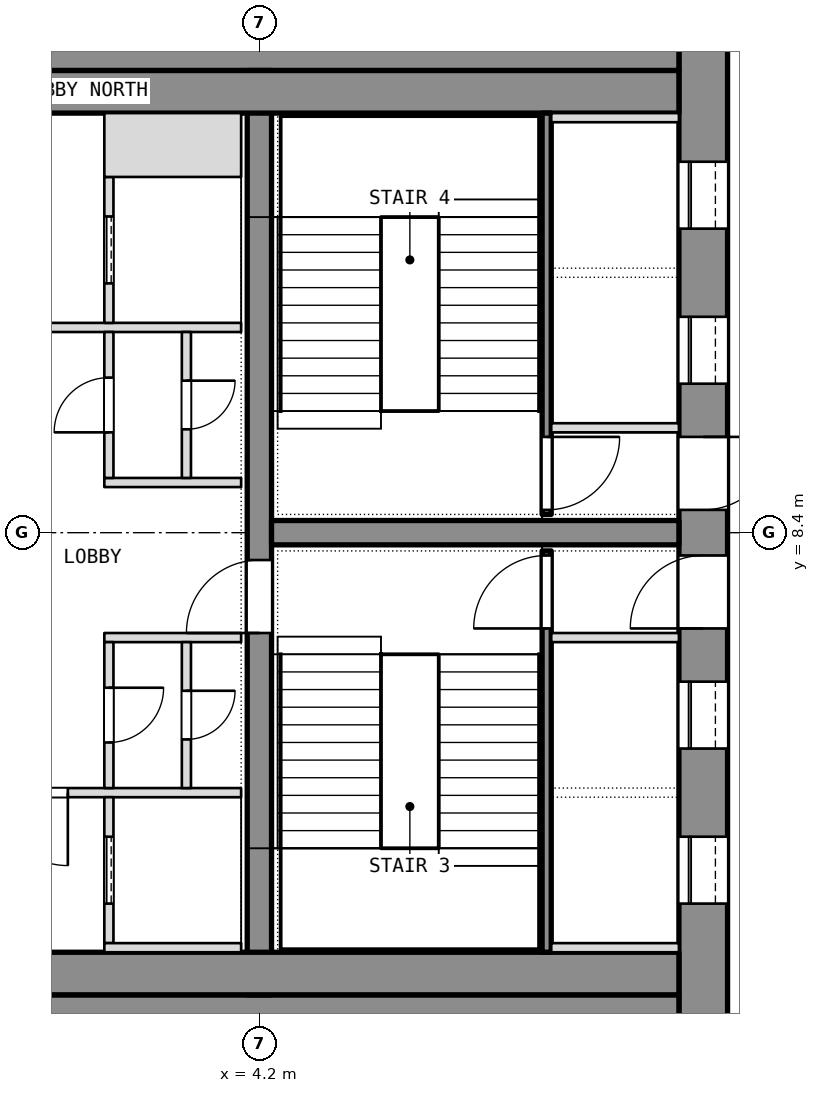
"""IFC4 building model, lengths in metres.
Left out: names, types, materials, properties, quantities, classifications, styles, units other than length and angle.
Written with IfcOpenShell. Run it as: python <this file> out.ifc"""

import sys

from ifc_helpers import new_model, si_unit, direction, frame, frame_2d, origin, place, context, subcontext, project, spatial, rectangle, extrude, element, fill, save


model = new_model("IFC4")
c1 = context("Model", 3, precision=1e-05, world=origin(), true_north=direction((0.0, 1.0)))
c2 = subcontext(c1, "Body", "Model", "MODEL_VIEW")
j1 = project(units=[si_unit("LENGTHUNIT", "METRE"), si_unit("PLANEANGLEUNIT", "RADIAN")], contexts=[c1])
p1 = place(None, origin())
s1 = spatial("IfcSite", under=j1, at=p1, CompositionType="ELEMENT")
p2 = place(p1, origin())
s2 = spatial("IfcBuilding", under=s1, at=p2, CompositionType="ELEMENT")
p3 = place(p2, frame((0.0, 0.0, 248.9)))
s3 = spatial("IfcBuildingStorey", under=s2, at=p3, CompositionType="ELEMENT", Elevation=248.9)
p4 = place(p3, frame((11.5, 0.0, 0.0), z_axis=(0.0, 0.0, 1.0), x_axis=(0.0, 1.0, 0.0)))
e1 = element("IfcWall", 1, at=p4, inside=s3, PredefinedType="SHEAR", context=c2, shape_type="SweptSolid", body=[
    extrude(rectangle(XDim=16.8, YDim=0.8, at=frame_2d((8.4, 0.0))), origin(), (0.0, 0.0, 1.0), 3.6),
])
p5 = place(p4, frame((2.3, 0.0, 0.0)))
e2 = element("IfcOpeningElement", 2, at=p5, cuts=e1, PredefinedType="OPENING", context=c2, shape_type="SweptSolid", body=[
    extrude(rectangle(XDim=1.1, YDim=2.1, at=frame_2d((0.55, 1.05))), frame((0.0, 0.4, 0.0), z_axis=(0.0, -1.0, 0.0), x_axis=(1.0, 0.0, 0.0)), (0.0, 0.0, 1.0), 0.8),
])
p6 = place(p4, frame((4.85, 0.0, 0.0)))
e3 = element("IfcOpeningElement", 3, at=p6, cuts=e1, PredefinedType="OPENING", context=c2, shape_type="SweptSolid", body=[
    extrude(rectangle(XDim=1.1, YDim=2.1, at=frame_2d((0.55, 1.05))), frame((0.0, 0.4, 0.0), z_axis=(0.0, -1.0, 0.0), x_axis=(1.0, 0.0, 0.0)), (0.0, 0.0, 1.0), 0.8),
])
p7 = place(p4, frame((6.825, 0.0, 0.0)))
e4 = element("IfcOpeningElement", 4, at=p7, cuts=e1, PredefinedType="OPENING", context=c2, shape_type="SweptSolid", body=[
    extrude(rectangle(XDim=1.2, YDim=2.1, at=frame_2d((0.6, 1.05))), frame((0.0, 0.4, 0.0), z_axis=(0.0, -1.0, 0.0), x_axis=(1.0, 0.0, 0.0)), (0.0, 0.0, 1.0), 0.8),
])
p8 = place(p4, frame((13.4, 0.0, 0.0)))
e5 = element("IfcOpeningElement", 5, at=p8, cuts=e1, PredefinedType="OPENING", context=c2, shape_type="SweptSolid", body=[
    extrude(rectangle(XDim=1.1, YDim=2.1, at=frame_2d((0.55, 1.05))), frame((0.0, 0.4, 0.0), z_axis=(0.0, -1.0, 0.0), x_axis=(1.0, 0.0, 0.0)), (0.0, 0.0, 1.0), 0.8),
])
p9 = place(p4, frame((10.85, 0.0, 0.0)))
e6 = element("IfcOpeningElement", 6, at=p9, cuts=e1, PredefinedType="OPENING", context=c2, shape_type="SweptSolid", body=[
    extrude(rectangle(XDim=1.1, YDim=2.1, at=frame_2d((0.55, 1.05))), frame((0.0, 0.4, 0.0), z_axis=(0.0, -1.0, 0.0), x_axis=(1.0, 0.0, 0.0)), (0.0, 0.0, 1.0), 0.8),
])
p10 = place(p4, frame((8.775, 0.0, 0.0)))
e7 = element("IfcOpeningElement", 7, at=p10, cuts=e1, PredefinedType="OPENING", context=c2, shape_type="SweptSolid", body=[
    extrude(rectangle(XDim=1.2, YDim=2.1, at=frame_2d((0.6, 1.05))), frame((0.0, 0.4, 0.0), z_axis=(0.0, -1.0, 0.0), x_axis=(1.0, 0.0, 0.0)), (0.0, 0.0, 1.0), 0.8),
])
for number, where, z_axis, x_axis in (
    (8, (-11.1, 0.4, 0.0), (0.0, 0.0, 1.0), (1.0, 0.0, 0.0)),
    (9, (-11.1, 16.4, 0.0), (0.0, 0.0, 1.0), (1.0, 0.0, 0.0)),
):
    element("IfcWall", number, at=place(p3, frame(where, z_axis=z_axis, x_axis=x_axis)), inside=s3, PredefinedType="SHEAR", context=c2, shape_type="SweptSolid", body=[
        extrude(rectangle(XDim=22.2, YDim=0.8, at=frame_2d((11.1, 0.0))), origin(), (0.0, 0.0, 1.0), 3.6),
    ])
p11 = place(p3, frame((4.2, 0.8, 0.0), z_axis=(0.0, 0.0, 1.0), x_axis=(0.0, 1.0, 0.0)))
e10 = element("IfcWall", 10, at=p11, inside=s3, PredefinedType="SHEAR", context=c2, shape_type="SweptSolid", body=[
    extrude(rectangle(XDim=15.2, YDim=0.4, at=frame_2d((7.6, 0.0))), origin(), (0.0, 0.0, 1.0), 3.6),
])
p12 = place(p11, frame((5.95, 0.0, 0.0)))
e11 = element("IfcOpeningElement", 11, at=p12, cuts=e10, PredefinedType="OPENING", context=c2, shape_type="SweptSolid", body=[
    extrude(rectangle(XDim=1.2, YDim=2.1, at=frame_2d((0.6, 1.05))), frame((0.0, 0.2, 0.0), z_axis=(0.0, -1.0, 0.0), x_axis=(1.0, 0.0, 0.0)), (0.0, 0.0, 1.0), 0.4),
])
p13 = place(p3, frame((4.4, 8.4, 0.0), z_axis=(0.0, 0.0, 1.0), x_axis=(1.0, 0.0, 0.0)))
e12 = element("IfcWall", 12, at=p13, inside=s3, PredefinedType="SHEAR", context=c2, shape_type="SweptSolid", body=[
    extrude(rectangle(XDim=6.7, YDim=0.4, at=frame_2d((3.35, 0.0))), origin(), (0.0, 0.0, 1.0), 3.6),
])
for number, where, z_axis, x_axis in (
    (13, (-11.1, 1.15, 0.0), (0.0, 0.0, 1.0), (1.0, 0.0, 0.0)),
    (14, (-11.1, 15.65, 0.0), (0.0, 0.0, 1.0), (1.0, 0.0, 0.0)),
):
    element("IfcWall", number, at=place(p3, frame(where, z_axis=z_axis, x_axis=x_axis)), inside=s3, PredefinedType="PARTITIONING", context=c2, shape_type="SweptSolid", body=[
        extrude(rectangle(XDim=22.2, YDim=0.7, at=frame_2d((11.1, 0.0))), origin(), (0.0, 0.0, 1.0), 3.3),
    ])
p14 = place(p3, frame((8.925, 1.5, 0.0), z_axis=(0.0, 0.0, 1.0), x_axis=(0.0, 1.0, 0.0)))
e15 = element("IfcWall", 15, at=p14, inside=s3, PredefinedType="SHEAR", context=c2, shape_type="SweptSolid", body=[
    extrude(rectangle(XDim=6.6, YDim=0.15, at=frame_2d((3.3, 0.0))), origin(), (0.0, 0.0, 1.0), 3.3),
])
p15 = place(p14, frame((5.325, 0.0, 0.0)))
e16 = element("IfcOpeningElement", 16, at=p15, cuts=e15, PredefinedType="OPENING", context=c2, shape_type="SweptSolid", body=[
    extrude(rectangle(XDim=1.2, YDim=2.1, at=frame_2d((0.6, 1.05))), frame((0.0, 0.075, 0.0), z_axis=(0.0, -1.0, 0.0), x_axis=(1.0, 0.0, 0.0)), (0.0, 0.0, 1.0), 0.15),
])
for number, where, z_axis, x_axis in (
    (17, (9.0, 6.675, 0.0), (0.0, 0.0, 1.0), (1.0, 0.0, 0.0)),
    (18, (9.0, 1.575, 0.0), (0.0, 0.0, 1.0), (1.0, 0.0, 0.0)),
):
    element("IfcWall", number, at=place(p3, frame(where, z_axis=z_axis, x_axis=x_axis)), inside=s3, PredefinedType="SHEAR", context=c2, shape_type="SweptSolid", body=[
        extrude(rectangle(XDim=2.1, YDim=0.15, at=frame_2d((1.05, 0.0))), origin(), (0.0, 0.0, 1.0), 3.6),
    ])
p16 = place(p3, frame((8.925, 8.7, 0.0), z_axis=(0.0, 0.0, 1.0), x_axis=(0.0, 1.0, 0.0)))
e19 = element("IfcWall", 19, at=p16, inside=s3, PredefinedType="SHEAR", context=c2, shape_type="SweptSolid", body=[
    extrude(rectangle(XDim=6.6, YDim=0.15, at=frame_2d((3.3, 0.0))), origin(), (0.0, 0.0, 1.0), 3.3),
])
p17 = place(p16, frame((0.075, 0.0, 0.0)))
e20 = element("IfcOpeningElement", 20, at=p17, cuts=e19, PredefinedType="OPENING", context=c2, shape_type="SweptSolid", body=[
    extrude(rectangle(XDim=1.2, YDim=2.1, at=frame_2d((0.6, 1.05))), frame((0.0, 0.075, 0.0), z_axis=(0.0, -1.0, 0.0), x_axis=(1.0, 0.0, 0.0)), (0.0, 0.0, 1.0), 0.15),
])
for number, where, z_axis, x_axis in (
    (21, (9.0, 10.125, 0.0), (0.0, 0.0, 1.0), (1.0, 0.0, 0.0)),
    (22, (9.0, 15.225, 0.0), (0.0, 0.0, 1.0), (1.0, 0.0, 0.0)),
):
    element("IfcWall", number, at=place(p3, frame(where, z_axis=z_axis, x_axis=x_axis)), inside=s3, PredefinedType="SHEAR", context=c2, shape_type="SweptSolid", body=[
        extrude(rectangle(XDim=2.1, YDim=0.15, at=frame_2d((1.05, 0.0))), origin(), (0.0, 0.0, 1.0), 3.6),
    ])
p18 = place(p3, frame((-3.9, 4.125, 0.0), z_axis=(0.0, 0.0, 1.0), x_axis=(1.0, 0.0, 0.0)))
e23 = element("IfcWall", 23, at=p18, inside=s3, PredefinedType="PARTITIONING", context=c2, shape_type="SweptSolid", body=[
    extrude(rectangle(XDim=7.8, YDim=0.15, at=frame_2d((3.9, 0.0))), origin(), (0.0, 0.0, 1.0), 3.3),
])
p19 = place(p18, frame((3.75, 0.0, 0.0)))
e24 = element("IfcOpeningElement", 24, at=p19, cuts=e23, PredefinedType="OPENING", context=c2, shape_type="SweptSolid", body=[
    extrude(rectangle(XDim=1.2, YDim=2.1, at=frame_2d((0.6, 1.05))), frame((0.0, 0.075, 0.0), z_axis=(0.0, -1.0, 0.0), x_axis=(1.0, 0.0, 0.0)), (0.0, 0.0, 1.0), 0.15),
])
p20 = place(p3, frame((-3.9, 11.775, 0.0), z_axis=(0.0, 0.0, 1.0), x_axis=(1.0, 0.0, 0.0)))
e25 = element("IfcWall", 25, at=p20, inside=s3, PredefinedType="PARTITIONING", context=c2, shape_type="SweptSolid", body=[
    extrude(rectangle(XDim=7.8, YDim=0.15, at=frame_2d((3.9, 0.0))), origin(), (0.0, 0.0, 1.0), 3.3),
])
p21 = place(p20, frame((3.3, 0.0, 0.0)))
e26 = element("IfcOpeningElement", 26, at=p21, cuts=e25, PredefinedType="OPENING", context=c2, shape_type="SweptSolid", body=[
    extrude(rectangle(XDim=1.2, YDim=2.1, at=frame_2d((0.6, 1.05))), frame((0.0, 0.075, 0.0), z_axis=(0.0, -1.0, 0.0), x_axis=(1.0, 0.0, 0.0)), (0.0, 0.0, 1.0), 0.15),
])
p22 = place(p3, frame((1.725, 1.65, 0.0), z_axis=(0.0, 0.0, 1.0), x_axis=(0.0, 1.0, 0.0)))
e27 = element("IfcWall", 27, at=p22, inside=s3, PredefinedType="SHEAR", context=c2, shape_type="SweptSolid", body=[
    extrude(rectangle(XDim=2.4, YDim=0.15, at=frame_2d((1.2, 0.0))), origin(), (0.0, 0.0, 1.0), 3.6),
])
p23 = place(p22, frame((0.65, 0.0, 0.0)))
e28 = element("IfcOpeningElement", 28, at=p23, cuts=e27, PredefinedType="OPENING", context=c2, shape_type="SweptSolid", body=[
    extrude(rectangle(XDim=1.1, YDim=2.1, at=frame_2d((0.55, 1.05))), frame((0.0, 0.075, 0.0), z_axis=(0.0, -1.0, 0.0), x_axis=(1.0, 0.0, 0.0)), (0.0, 0.0, 1.0), 0.15),
])
p24 = place(p3, frame((1.65, 1.575, 0.0), z_axis=(0.0, 0.0, 1.0), x_axis=(1.0, 0.0, 0.0)))
e29 = element("IfcWall", 29, at=p24, inside=s3, PredefinedType="SHEAR", context=c2, shape_type="SweptSolid", body=[
    extrude(rectangle(XDim=2.25, YDim=0.15, at=frame_2d((1.125, 0.0))), origin(), (0.0, 0.0, 1.0), 3.6),
])
p25 = place(p3, frame((1.725, 11.85, 0.0), z_axis=(0.0, 0.0, 1.0), x_axis=(0.0, 1.0, 0.0)))
e30 = element("IfcWall", 30, at=p25, inside=s3, PredefinedType="SHEAR", context=c2, shape_type="SweptSolid", body=[
    extrude(rectangle(XDim=2.4, YDim=0.15, at=frame_2d((1.2, 0.0))), origin(), (0.0, 0.0, 1.0), 3.6),
])
p26 = place(p25, frame((0.65, 0.0, 0.0)))
e31 = element("IfcOpeningElement", 31, at=p26, cuts=e30, PredefinedType="OPENING", context=c2, shape_type="SweptSolid", body=[
    extrude(rectangle(XDim=1.1, YDim=2.1, at=frame_2d((0.55, 1.05))), frame((0.0, 0.075, 0.0), z_axis=(0.0, -1.0, 0.0), x_axis=(1.0, 0.0, 0.0)), (0.0, 0.0, 1.0), 0.15),
])
p27 = place(p3, frame((1.65, 14.775, 0.0), z_axis=(0.0, 0.0, 1.0), x_axis=(1.0, 0.0, 0.0)))
e32 = element("IfcWall", 32, at=p27, inside=s3, PredefinedType="SHEAR", context=c2, shape_type="SweptSolid", body=[
    extrude(rectangle(XDim=2.25, YDim=1.05, at=frame_2d((1.125, 0.0))), origin(), (0.0, 0.0, 1.0), 3.6),
])
for number, where, z_axis, x_axis in (
    (33, (1.65, 6.675, 0.0), (0.0, 0.0, 1.0), (1.0, 0.0, 0.0)),
    (34, (1.65, 9.225, 0.0), (0.0, 0.0, 1.0), (1.0, 0.0, 0.0)),
):
    element("IfcWall", number, at=place(p3, frame(where, z_axis=z_axis, x_axis=x_axis)), inside=s3, PredefinedType="PARTITIONING", context=c2, shape_type="SweptSolid", body=[
        extrude(rectangle(XDim=2.25, YDim=0.15, at=frame_2d((1.125, 0.0))), origin(), (0.0, 0.0, 1.0), 3.3),
    ])
p28 = place(p3, frame((1.725, 4.2, 0.0), z_axis=(0.0, 0.0, 1.0), x_axis=(0.0, 1.0, 0.0)))
e35 = element("IfcWall", 35, at=p28, inside=s3, PredefinedType="PARTITIONING", context=c2, shape_type="SweptSolid", body=[
    extrude(rectangle(XDim=2.4, YDim=0.15, at=frame_2d((1.2, 0.0))), origin(), (0.0, 0.0, 1.0), 3.3),
])
p29 = place(p28, frame((0.75, 0.0, 0.0)))
e36 = element("IfcOpeningElement", 36, at=p29, cuts=e35, PredefinedType="OPENING", context=c2, shape_type="SweptSolid", body=[
    extrude(rectangle(XDim=0.9, YDim=2.1, at=frame_2d((0.45, 1.05))), frame((0.0, 0.075, 0.0), z_axis=(0.0, -1.0, 0.0), x_axis=(1.0, 0.0, 0.0)), (0.0, 0.0, 1.0), 0.15),
])
p30 = place(p3, frame((1.725, 9.3, 0.0), z_axis=(0.0, 0.0, 1.0), x_axis=(0.0, 1.0, 0.0)))
e37 = element("IfcWall", 37, at=p30, inside=s3, PredefinedType="PARTITIONING", context=c2, shape_type="SweptSolid", body=[
    extrude(rectangle(XDim=2.4, YDim=0.15, at=frame_2d((1.2, 0.0))), origin(), (0.0, 0.0, 1.0), 3.3),
])
p31 = place(p30, frame((0.75, 0.0, 0.0)))
e38 = element("IfcOpeningElement", 38, at=p31, cuts=e37, PredefinedType="OPENING", context=c2, shape_type="SweptSolid", body=[
    extrude(rectangle(XDim=0.9, YDim=2.1, at=frame_2d((0.45, 1.05))), frame((0.0, 0.075, 0.0), z_axis=(0.0, -1.0, 0.0), x_axis=(1.0, 0.0, 0.0)), (0.0, 0.0, 1.0), 0.15),
])
p32 = place(p3, frame((3.0, 4.2, 0.0), z_axis=(0.0, 0.0, 1.0), x_axis=(0.0, 1.0, 0.0)))
e39 = element("IfcWall", 39, at=p32, inside=s3, PredefinedType="PARTITIONING", context=c2, shape_type="SweptSolid", body=[
    extrude(rectangle(XDim=2.4, YDim=0.15, at=frame_2d((1.2, 0.0))), origin(), (0.0, 0.0, 1.0), 3.3),
])
p33 = place(p32, frame((0.8, 0.0, 0.0)))
e40 = element("IfcOpeningElement", 40, at=p33, cuts=e39, PredefinedType="OPENING", context=c2, shape_type="SweptSolid", body=[
    extrude(rectangle(XDim=0.8, YDim=2.1, at=frame_2d((0.4, 1.05))), frame((0.0, 0.075, 0.0), z_axis=(0.0, -1.0, 0.0), x_axis=(1.0, 0.0, 0.0)), (0.0, 0.0, 1.0), 0.15),
])
p34 = place(p3, frame((3.0, 9.3, 0.0), z_axis=(0.0, 0.0, 1.0), x_axis=(0.0, 1.0, 0.0)))
e41 = element("IfcWall", 41, at=p34, inside=s3, PredefinedType="PARTITIONING", context=c2, shape_type="SweptSolid", body=[
    extrude(rectangle(XDim=2.4, YDim=0.15, at=frame_2d((1.2, 0.0))), origin(), (0.0, 0.0, 1.0), 3.3),
])
p35 = place(p34, frame((0.8, 0.0, 0.0)))
e42 = element("IfcOpeningElement", 42, at=p35, cuts=e41, PredefinedType="OPENING", context=c2, shape_type="SweptSolid", body=[
    extrude(rectangle(XDim=0.8, YDim=2.1, at=frame_2d((0.4, 1.05))), frame((0.0, 0.075, 0.0), z_axis=(0.0, -1.0, 0.0), x_axis=(1.0, 0.0, 0.0)), (0.0, 0.0, 1.0), 0.15),
])
p36 = place(p5, origin())
e43 = element("IfcDoor", 43, at=p36, inside=s3, OperationType="SLIDING_TO_LEFT", PredefinedType="DOOR", context=c2, shape_type="SweptSolid", body=[
    extrude(rectangle(XDim=1.1, YDim=2.1, at=frame_2d((0.55, 1.05))), frame((0.0, 0.025, 0.0), z_axis=(0.0, -1.0, 0.0), x_axis=(1.0, 0.0, 0.0)), (0.0, 0.0, 1.0), 0.05),
])
fill(e2, e43)
p37 = place(p6, origin())
e44 = element("IfcDoor", 44, at=p37, inside=s3, OperationType="SLIDING_TO_LEFT", PredefinedType="DOOR", context=c2, shape_type="SweptSolid", body=[
    extrude(rectangle(XDim=1.1, YDim=2.1, at=frame_2d((0.55, 1.05))), frame((0.0, 0.025, 0.0), z_axis=(0.0, -1.0, 0.0), x_axis=(1.0, 0.0, 0.0)), (0.0, 0.0, 1.0), 0.05),
])
fill(e3, e44)
p38 = place(p7, origin())
e45 = element("IfcDoor", 45, at=p38, inside=s3, OperationType="SINGLE_SWING_LEFT", PredefinedType="DOOR", context=c2, shape_type="SweptSolid", body=[
    extrude(rectangle(XDim=1.2, YDim=2.1, at=frame_2d((0.6, 1.05))), frame((0.0, 0.025, 0.0), z_axis=(0.0, -1.0, 0.0), x_axis=(1.0, 0.0, 0.0)), (0.0, 0.0, 1.0), 0.05),
])
fill(e4, e45)
p39 = place(p15, origin())
e46 = element("IfcDoor", 46, at=p39, inside=s3, OperationType="SINGLE_SWING_LEFT", PredefinedType="DOOR", context=c2, shape_type="SweptSolid", body=[
    extrude(rectangle(XDim=1.2, YDim=2.1, at=frame_2d((0.6, 1.05))), frame((0.0, 0.025, 0.0), z_axis=(0.0, -1.0, 0.0), x_axis=(1.0, 0.0, 0.0)), (0.0, 0.0, 1.0), 0.05),
])
fill(e16, e46)
p40 = place(p8, origin())
e47 = element("IfcDoor", 47, at=p40, inside=s3, OperationType="SLIDING_TO_LEFT", PredefinedType="DOOR", context=c2, shape_type="SweptSolid", body=[
    extrude(rectangle(XDim=1.1, YDim=2.1, at=frame_2d((0.55, 1.05))), frame((0.0, 0.025, 0.0), z_axis=(0.0, -1.0, 0.0), x_axis=(1.0, 0.0, 0.0)), (0.0, 0.0, 1.0), 0.05),
])
fill(e5, e47)
p41 = place(p9, origin())
e48 = element("IfcDoor", 48, at=p41, inside=s3, OperationType="SLIDING_TO_LEFT", PredefinedType="DOOR", context=c2, shape_type="SweptSolid", body=[
    extrude(rectangle(XDim=1.1, YDim=2.1, at=frame_2d((0.55, 1.05))), frame((0.0, 0.025, 0.0), z_axis=(0.0, -1.0, 0.0), x_axis=(1.0, 0.0, 0.0)), (0.0, 0.0, 1.0), 0.05),
])
fill(e6, e48)
p42 = place(p10, origin())
e49 = element("IfcDoor", 49, at=p42, inside=s3, OperationType="SINGLE_SWING_LEFT", PredefinedType="DOOR", context=c2, shape_type="SweptSolid", body=[
    extrude(rectangle(XDim=1.2, YDim=2.1, at=frame_2d((0.6, 1.05))), frame((0.0, 0.025, 0.0), z_axis=(0.0, -1.0, 0.0), x_axis=(1.0, 0.0, 0.0)), (0.0, 0.0, 1.0), 0.05),
])
fill(e7, e49)
p43 = place(p17, origin())
e50 = element("IfcDoor", 50, at=p43, inside=s3, OperationType="SINGLE_SWING_LEFT", PredefinedType="DOOR", context=c2, shape_type="SweptSolid", body=[
    extrude(rectangle(XDim=1.2, YDim=2.1, at=frame_2d((0.6, 1.05))), frame((0.0, 0.025, 0.0), z_axis=(0.0, -1.0, 0.0), x_axis=(1.0, 0.0, 0.0)), (0.0, 0.0, 1.0), 0.05),
])
fill(e20, e50)
p44 = place(p29, origin())
e51 = element("IfcDoor", 51, at=p44, inside=s3, OperationType="SINGLE_SWING_LEFT", PredefinedType="DOOR", context=c2, shape_type="SweptSolid", body=[
    extrude(rectangle(XDim=0.9, YDim=2.1, at=frame_2d((0.45, 1.05))), frame((0.0, 0.025, 0.0), z_axis=(0.0, -1.0, 0.0), x_axis=(1.0, 0.0, 0.0)), (0.0, 0.0, 1.0), 0.05),
])
fill(e36, e51)
p45 = place(p33, origin())
e52 = element("IfcDoor", 52, at=p45, inside=s3, OperationType="SINGLE_SWING_LEFT", PredefinedType="DOOR", context=c2, shape_type="SweptSolid", body=[
    extrude(rectangle(XDim=0.8, YDim=2.1, at=frame_2d((0.4, 1.05))), frame((0.0, 0.025, 0.0), z_axis=(0.0, -1.0, 0.0), x_axis=(1.0, 0.0, 0.0)), (0.0, 0.0, 1.0), 0.05),
])
fill(e40, e52)
p46 = place(p31, origin())
e53 = element("IfcDoor", 53, at=p46, inside=s3, OperationType="SINGLE_SWING_LEFT", PredefinedType="DOOR", context=c2, shape_type="SweptSolid", body=[
    extrude(rectangle(XDim=0.9, YDim=2.1, at=frame_2d((0.45, 1.05))), frame((0.0, 0.025, 0.0), z_axis=(0.0, -1.0, 0.0), x_axis=(1.0, 0.0, 0.0)), (0.0, 0.0, 1.0), 0.05),
])
fill(e38, e53)
p47 = place(p35, origin())
e54 = element("IfcDoor", 54, at=p47, inside=s3, OperationType="SINGLE_SWING_LEFT", PredefinedType="DOOR", context=c2, shape_type="SweptSolid", body=[
    extrude(rectangle(XDim=0.8, YDim=2.1, at=frame_2d((0.4, 1.05))), frame((0.0, 0.025, 0.0), z_axis=(0.0, -1.0, 0.0), x_axis=(1.0, 0.0, 0.0)), (0.0, 0.0, 1.0), 0.05),
])
fill(e42, e54)
p48 = place(p23, origin())
e55 = element("IfcDoor", 55, at=p48, inside=s3, OperationType="SLIDING_TO_LEFT", PredefinedType="DOOR", context=c2, shape_type="SweptSolid", body=[
    extrude(rectangle(XDim=1.1, YDim=2.1, at=frame_2d((0.55, 1.05))), frame((0.0, 0.025, 0.0), z_axis=(0.0, -1.0, 0.0), x_axis=(1.0, 0.0, 0.0)), (0.0, 0.0, 1.0), 0.05),
])
fill(e28, e55)
p49 = place(p26, origin())
e56 = element("IfcDoor", 56, at=p49, inside=s3, OperationType="SLIDING_TO_LEFT", PredefinedType="DOOR", context=c2, shape_type="SweptSolid", body=[
    extrude(rectangle(XDim=1.1, YDim=2.1, at=frame_2d((0.55, 1.05))), frame((0.0, 0.025, 0.0), z_axis=(0.0, -1.0, 0.0), x_axis=(1.0, 0.0, 0.0)), (0.0, 0.0, 1.0), 0.05),
])
fill(e31, e56)
p50 = place(p19, origin())
e57 = element("IfcDoor", 57, at=p50, inside=s3, OperationType="SINGLE_SWING_LEFT", PredefinedType="DOOR", context=c2, shape_type="SweptSolid", body=[
    extrude(rectangle(XDim=1.2, YDim=2.1, at=frame_2d((0.6, 1.05))), frame((0.0, 0.025, 0.0), z_axis=(0.0, -1.0, 0.0), x_axis=(1.0, 0.0, 0.0)), (0.0, 0.0, 1.0), 0.05),
])
fill(e24, e57)
p51 = place(p12, origin())
e58 = element("IfcDoor", 58, at=p51, inside=s3, OperationType="SINGLE_SWING_LEFT", PredefinedType="DOOR", context=c2, shape_type="SweptSolid", body=[
    extrude(rectangle(XDim=1.2, YDim=2.1, at=frame_2d((0.6, 1.05))), frame((0.0, 0.025, 0.0), z_axis=(0.0, -1.0, 0.0), x_axis=(1.0, 0.0, 0.0)), (0.0, 0.0, 1.0), 0.05),
])
fill(e11, e58)
save(model, sys.argv[1])
